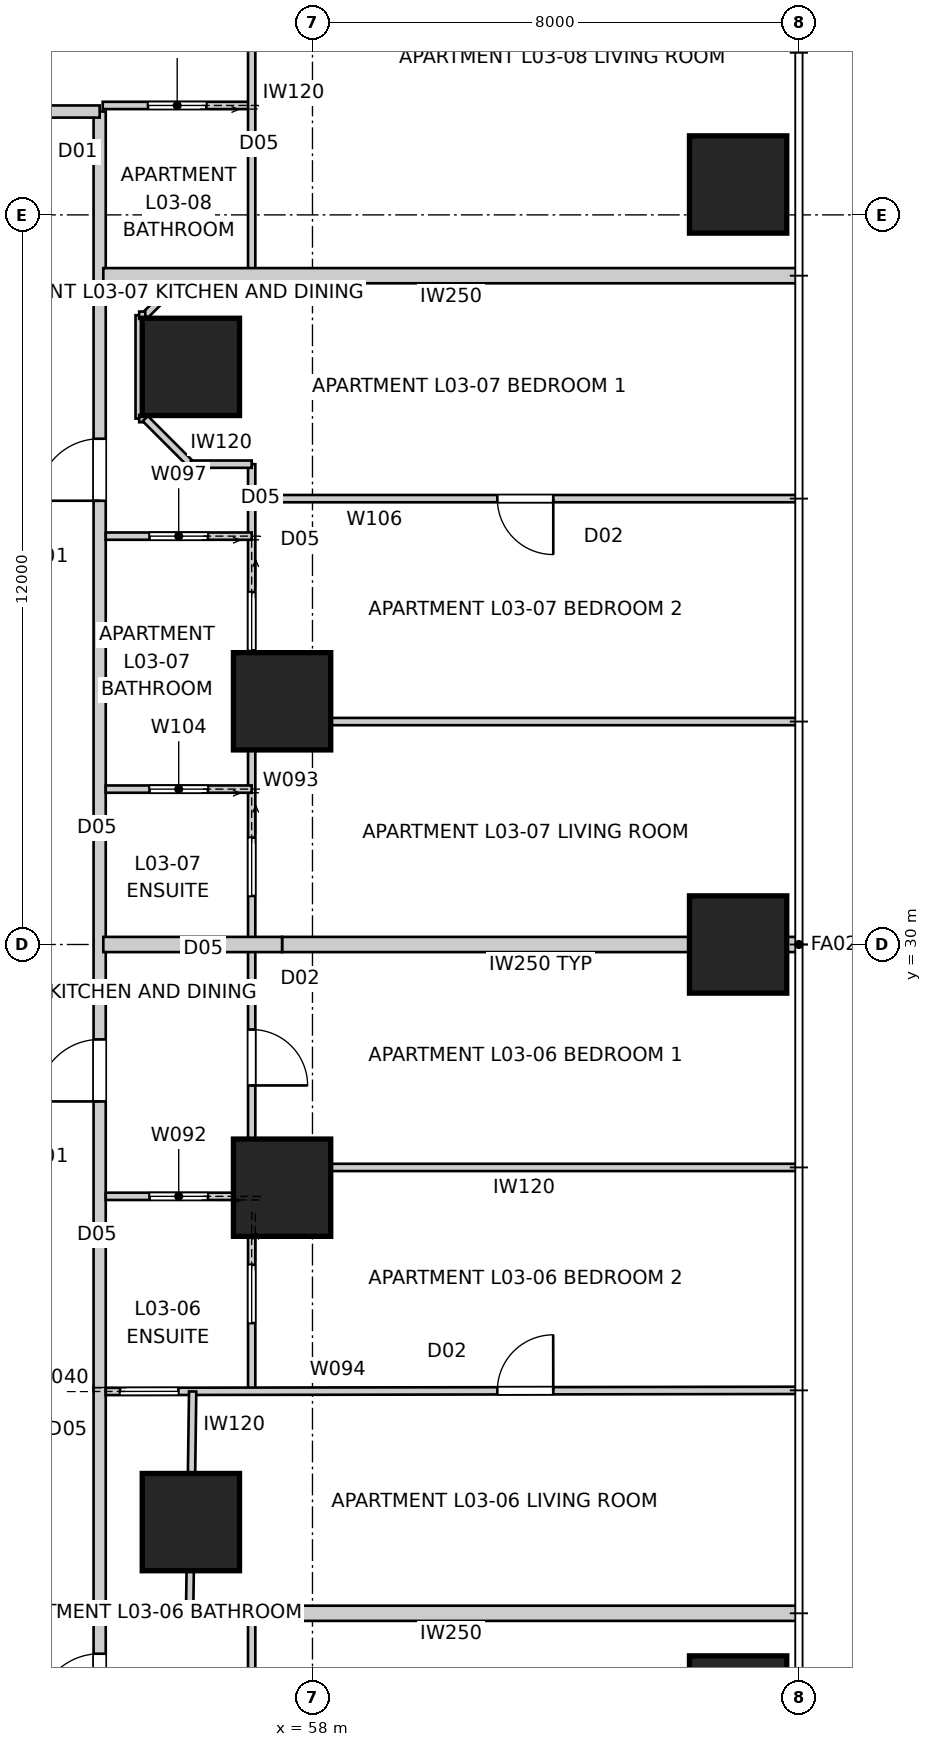
"""IFC4 building model, lengths in metres.
Left out: names, types, materials, properties, quantities, classifications, styles, units other than length and angle.
Written with IfcOpenShell. Run it as: python <this file> out.ifc"""

import sys

from ifc_helpers import new_model, si_unit, direction, frame, frame_2d, origin, origin_2d, place, context, subcontext, project, spatial, rectangle, extrude, element, fill, save


model = new_model("IFC4")
c1 = context("Model", 3, precision=1e-05, world=origin(), true_north=direction((0.0, 1.0)))
c2 = subcontext(c1, "Body", "Model", "MODEL_VIEW")
j1 = project(units=[si_unit("LENGTHUNIT", "METRE"), si_unit("PLANEANGLEUNIT", "RADIAN")], contexts=[c1])
p1 = place(None, origin())
s1 = spatial("IfcSite", under=j1, at=p1, CompositionType="ELEMENT")
p2 = place(p1, origin())
s2 = spatial("IfcBuilding", under=s1, at=p2, CompositionType="ELEMENT")
p3 = place(p2, frame((0.0, 0.0, 15.0)))
s3 = spatial("IfcBuildingStorey", under=s2, at=p3, CompositionType="ELEMENT", Elevation=15.0)
for number, where, z_axis, x_axis in (
    (1, (65.0, 17.5, 0.0), (0.0, 0.0, 1.0), (1.0, 0.0, 0.0)),
    (2, (65.0, 30.0, 0.0), (0.0, 0.0, 1.0), (1.0, 0.0, 0.0)),
    (3, (65.0, 42.5, 0.0), (0.0, 0.0, 1.0), (1.0, 0.0, 0.0)),
    (4, (57.5, 26.0, 0.0), (0.0, 0.0, 1.0), (1.0, 0.0, 0.0)),
    (5, (57.5, 34.0, 0.0), (0.0, 0.0, 1.0), (1.0, 0.0, 0.0)),
    (6, (56.0, 39.5, 0.0), (0.0, 0.0, 1.0), (1.0, 0.0, 0.0)),
    (7, (56.0, 20.5, 0.0), (0.0, 0.0, 1.0), (1.0, 0.0, 0.0)),
):
    element("IfcColumn", number, at=place(p3, frame(where, z_axis=z_axis, x_axis=x_axis)), inside=s3, PredefinedType="COLUMN", context=c2, shape_type="SweptSolid", body=[
        extrude(rectangle(XDim=1.6, YDim=1.6, at=origin_2d()), origin(), (0.0, 0.0, 1.0), 3.4),
    ])
p4 = place(p3, frame((54.5, 16.3, 0.0), z_axis=(0.0, 0.0, 1.0), x_axis=(0.0, 1.0, 0.0)))
e8 = element("IfcWall", 8, at=p4, inside=s3, PredefinedType="PARTITIONING", context=c2, shape_type="SweptSolid", body=[
    extrude(rectangle(XDim=27.4, YDim=0.2, at=frame_2d((13.7, 0.0))), origin(), (0.0, 0.0, 1.0), 3.25),
])
p5 = place(p4, frame((20.998, 0.0, 0.0)))
e9 = element("IfcOpeningElement", 9, at=p5, cuts=e8, PredefinedType="OPENING", context=c2, shape_type="SweptSolid", body=[
    extrude(rectangle(XDim=1.02, YDim=2.34, at=frame_2d((0.51, 1.17))), frame((0.0, 0.11, 0.0), z_axis=(0.0, -1.0, 0.0), x_axis=(1.0, 0.0, 0.0)), (0.0, 0.0, 1.0), 0.22),
])
p6 = place(p4, frame((11.119, 0.0, 0.0)))
e10 = element("IfcOpeningElement", 10, at=p6, cuts=e8, PredefinedType="OPENING", context=c2, shape_type="SweptSolid", body=[
    extrude(rectangle(XDim=1.02, YDim=2.34, at=frame_2d((0.51, 1.17))), frame((0.0, 0.11, 0.0), z_axis=(0.0, -1.0, 0.0), x_axis=(1.0, 0.0, 0.0)), (0.0, 0.0, 1.0), 0.22),
])
p7 = place(p4, frame((1.015, 0.0, 0.0)))
e11 = element("IfcOpeningElement", 11, at=p7, cuts=e8, PredefinedType="OPENING", context=c2, shape_type="SweptSolid", body=[
    extrude(rectangle(XDim=1.02, YDim=2.34, at=frame_2d((0.51, 1.17))), frame((0.0, 0.11, 0.0), z_axis=(0.0, -1.0, 0.0), x_axis=(1.0, 0.0, 0.0)), (0.0, 0.0, 1.0), 0.22),
])
p8 = place(p3, frame((54.5, 43.7, 0.0), z_axis=(0.0, 0.0, 1.0), x_axis=(-1.0, 0.0, 0.0)))
e12 = element("IfcWall", 12, at=p8, inside=s3, PredefinedType="PARTITIONING", context=c2, shape_type="SweptSolid", body=[
    extrude(rectangle(XDim=29.0, YDim=0.2, at=frame_2d((14.5, 0.0))), origin(), (0.0, 0.0, 1.0), 3.25),
])
p9 = place(p8, frame((22.253, 0.0, 0.0)))
e13 = element("IfcOpeningElement", 13, at=p9, cuts=e12, PredefinedType="OPENING", context=c2, shape_type="SweptSolid", body=[
    extrude(rectangle(XDim=1.02, YDim=2.34, at=frame_2d((0.51, 1.17))), frame((0.0, 0.11, 0.0), z_axis=(0.0, -1.0, 0.0), x_axis=(1.0, 0.0, 0.0)), (0.0, 0.0, 1.0), 0.22),
])
p10 = place(p8, frame((5.393, 0.0, 0.0)))
e14 = element("IfcOpeningElement", 14, at=p10, cuts=e12, PredefinedType="OPENING", context=c2, shape_type="SweptSolid", body=[
    extrude(rectangle(XDim=1.02, YDim=2.34, at=frame_2d((0.51, 1.17))), frame((0.0, 0.11, 0.0), z_axis=(0.0, -1.0, 0.0), x_axis=(1.0, 0.0, 0.0)), (0.0, 0.0, 1.0), 0.22),
])
p11 = place(p8, frame((1.281, 0.0, 0.0)))
e15 = element("IfcOpeningElement", 15, at=p11, cuts=e12, PredefinedType="OPENING", context=c2, shape_type="SweptSolid", body=[
    extrude(rectangle(XDim=1.02, YDim=2.34, at=frame_2d((0.51, 1.17))), frame((0.0, 0.11, 0.0), z_axis=(0.0, -1.0, 0.0), x_axis=(1.0, 0.0, 0.0)), (0.0, 0.0, 1.0), 0.22),
])
for number, where, z_axis, x_axis in (
    (16, (66.0, 19.0, 0.0), (0.0, 0.0, 1.0), (-1.0, 0.0, 0.0)),
    (17, (66.0, 41.0, 0.0), (0.0, 0.0, 1.0), (-1.0, 0.0, 0.0)),
):
    element("IfcWall", number, at=place(p3, frame(where, z_axis=z_axis, x_axis=x_axis)), inside=s3, PredefinedType="PARTITIONING", context=c2, shape_type="SweptSolid", body=[
        extrude(rectangle(XDim=11.44, YDim=0.25, at=frame_2d((5.72, 0.0))), origin(), (0.0, 0.0, 1.0), 3.25),
    ])
p12 = place(p3, frame((66.0, 30.0, 0.0), z_axis=(0.0, 0.0, 1.0), x_axis=(-1.0, 0.0, 0.0)))
e18 = element("IfcWall", 18, at=p12, inside=s3, PredefinedType="PARTITIONING", context=c2, shape_type="SweptSolid", body=[
    extrude(rectangle(XDim=8.5, YDim=0.25, at=frame_2d((4.25, 0.0))), origin(), (0.0, 0.0, 1.0), 3.25),
])
p13 = place(p3, frame((57.5, 30.0, 0.0), z_axis=(0.0, 0.0, 1.0), x_axis=(-1.0, 0.0, 0.0)))
e19 = element("IfcWall", 19, at=p13, inside=s3, PredefinedType="PARTITIONING", context=c2, shape_type="SweptSolid", body=[
    extrude(rectangle(XDim=2.94, YDim=0.25, at=frame_2d((1.47, 0.0))), origin(), (0.0, 0.0, 1.0), 2.796),
])
p14 = place(p3, frame((57.0, 19.0, 0.0), z_axis=(0.0, 0.0, 1.0), x_axis=(0.0, -1.0, 0.0)))
e20 = element("IfcWall", 20, at=p14, inside=s3, PredefinedType="PARTITIONING", context=c2, shape_type="SweptSolid", body=[
    extrude(rectangle(XDim=6.0, YDim=0.12, at=frame_2d((3.0, 0.0))), origin(), (0.0, 0.0, 1.0), 3.25),
])
p15 = place(p14, frame((2.54, 0.0, 0.0)))
e21 = element("IfcOpeningElement", 21, at=p15, cuts=e20, PredefinedType="OPENING", context=c2, shape_type="SweptSolid", body=[
    extrude(rectangle(XDim=0.92, YDim=2.34, at=frame_2d((0.46, 1.17))), frame((0.0, 0.07, 0.0), z_axis=(0.0, -1.0, 0.0), x_axis=(1.0, 0.0, 0.0)), (0.0, 0.0, 1.0), 0.14),
])
p16 = place(p3, frame((57.0, 25.858, 0.0), z_axis=(0.0, 0.0, 1.0), x_axis=(-1.0, 0.0, 0.0)))
e22 = element("IfcWall", 22, at=p16, inside=s3, PredefinedType="PARTITIONING", context=c2, shape_type="SweptSolid", body=[
    extrude(rectangle(XDim=2.4, YDim=0.12, at=frame_2d((1.2, 0.0))), origin(), (0.0, 0.0, 1.0), 3.25),
])
p17 = place(p16, frame((0.72, 0.0, 0.0)))
e23 = element("IfcOpeningElement", 23, at=p17, cuts=e22, PredefinedType="OPENING", context=c2, shape_type="SweptSolid", body=[
    extrude(rectangle(XDim=0.96, YDim=2.1, at=frame_2d((0.48, 1.05))), frame((0.0, 0.07, 0.0), z_axis=(0.0, -1.0, 0.0), x_axis=(1.0, 0.0, 0.0)), (0.0, 0.0, 1.0), 0.14),
])
p18 = place(p3, frame((57.0, 37.9, 0.0), z_axis=(0.0, 0.0, 1.0), x_axis=(0.0, -1.0, 0.0)))
e24 = element("IfcWall", 24, at=p18, inside=s3, PredefinedType="PARTITIONING", context=c2, shape_type="SweptSolid", body=[
    extrude(rectangle(XDim=15.251, YDim=0.12, at=frame_2d((7.625, 0.0))), origin(), (0.0, 0.0, 1.0), 2.549),
])
p19 = place(p18, frame((9.298, 0.0, 0.0)))
e25 = element("IfcOpeningElement", 25, at=p19, cuts=e24, PredefinedType="OPENING", context=c2, shape_type="SweptSolid", body=[
    extrude(rectangle(XDim=0.92, YDim=2.34, at=frame_2d((0.46, 1.17))), frame((0.0, 0.07, 0.0), z_axis=(0.0, -1.0, 0.0), x_axis=(1.0, 0.0, 0.0)), (0.0, 0.0, 1.0), 0.14),
])
p20 = place(p18, frame((2.104, 0.0, 0.0)))
e26 = element("IfcOpeningElement", 26, at=p20, cuts=e24, PredefinedType="OPENING", context=c2, shape_type="SweptSolid", body=[
    extrude(rectangle(XDim=0.96, YDim=2.1, at=frame_2d((0.48, 1.05))), frame((0.0, 0.07, 0.0), z_axis=(0.0, -1.0, 0.0), x_axis=(1.0, 0.0, 0.0)), (0.0, 0.0, 1.0), 0.14),
])
p21 = place(p18, frame((13.167, 0.0, 0.0)))
e27 = element("IfcOpeningElement", 27, at=p21, cuts=e24, PredefinedType="OPENING", context=c2, shape_type="SweptSolid", body=[
    extrude(rectangle(XDim=0.96, YDim=2.1, at=frame_2d((0.48, 1.05))), frame((0.0, 0.07, 0.0), z_axis=(0.0, -1.0, 0.0), x_axis=(1.0, 0.0, 0.0)), (0.0, 0.0, 1.0), 0.14),
])
p22 = place(p18, frame((6.142, 0.0, 0.0)))
e28 = element("IfcOpeningElement", 28, at=p22, cuts=e24, PredefinedType="OPENING", context=c2, shape_type="SweptSolid", body=[
    extrude(rectangle(XDim=0.96, YDim=2.1, at=frame_2d((0.48, 1.05))), frame((0.0, 0.07, 0.0), z_axis=(0.0, -1.0, 0.0), x_axis=(1.0, 0.0, 0.0)), (0.0, 0.0, 1.0), 0.14),
])
p23 = place(p3, frame((54.6, 22.649, 0.0), z_axis=(0.0, 0.0, 1.0), x_axis=(0.999998735361, 0.001590369792, 0.0)))
e29 = element("IfcWall", 29, at=p23, inside=s3, PredefinedType="PARTITIONING", context=c2, shape_type="SweptSolid", body=[
    extrude(rectangle(XDim=11.36, YDim=0.12, at=frame_2d((5.68, 0.0))), origin(), (0.0, 0.0, 1.0), 3.25),
])
p24 = place(p23, frame((0.235, 0.0, 0.0)))
e30 = element("IfcOpeningElement", 30, at=p24, cuts=e29, PredefinedType="OPENING", context=c2, shape_type="SweptSolid", body=[
    extrude(rectangle(XDim=0.96, YDim=2.1, at=frame_2d((0.48, 1.05))), frame((0.0, 0.07, 0.0), z_axis=(0.0, -1.0, 0.0), x_axis=(1.0, 0.0, 0.0)), (0.0, 0.0, 1.0), 0.14),
])
p25 = place(p23, frame((6.44, 0.0, 0.0)))
e31 = element("IfcOpeningElement", 31, at=p25, cuts=e29, PredefinedType="OPENING", context=c2, shape_type="SweptSolid", body=[
    extrude(rectangle(XDim=0.92, YDim=2.34, at=frame_2d((0.46, 1.17))), frame((0.0, 0.07, 0.0), z_axis=(0.0, -1.0, 0.0), x_axis=(1.0, 0.0, 0.0)), (0.0, 0.0, 1.0), 0.14),
])
p26 = place(p3, frame((56.029, 22.649, 0.0), z_axis=(0.0, 0.0, 1.0), x_axis=(-0.013648778697, -0.999906851082, 0.0)))
e32 = element("IfcWall", 32, at=p26, inside=s3, PredefinedType="PARTITIONING", context=c2, shape_type="SweptSolid", body=[
    extrude(rectangle(XDim=3.649, YDim=0.12, at=frame_2d((1.824, 0.0))), origin(), (0.0, 0.0, 1.0), 2.549),
])
p27 = place(p3, frame((65.96, 26.333, 0.0), z_axis=(0.0, 0.0, 1.0), x_axis=(-1.0, 0.0, 0.0)))
e33 = element("IfcWall", 33, at=p27, inside=s3, PredefinedType="PARTITIONING", context=c2, shape_type="SweptSolid", body=[
    extrude(rectangle(XDim=8.96, YDim=0.12, at=frame_2d((4.48, 0.0))), origin(), (0.0, 0.0, 1.0), 3.25),
])
p28 = place(p3, frame((57.0, 36.716, 0.0), z_axis=(0.0, 0.0, 1.0), x_axis=(-1.0, 0.0, 0.0)))
e34 = element("IfcWall", 34, at=p28, inside=s3, PredefinedType="PARTITIONING", context=c2, shape_type="SweptSolid", body=[
    extrude(rectangle(XDim=2.4, YDim=0.12, at=frame_2d((1.2, 0.0))), origin(), (0.0, 0.0, 1.0), 3.25),
])
p29 = place(p28, frame((0.72, 0.0, 0.0)))
e35 = element("IfcOpeningElement", 35, at=p29, cuts=e34, PredefinedType="OPENING", context=c2, shape_type="SweptSolid", body=[
    extrude(rectangle(XDim=0.96, YDim=2.1, at=frame_2d((0.48, 1.05))), frame((0.0, 0.07, 0.0), z_axis=(0.0, -1.0, 0.0), x_axis=(1.0, 0.0, 0.0)), (0.0, 0.0, 1.0), 0.14),
])
p30 = place(p3, frame((55.9, 41.0, 0.0), z_axis=(0.0, 0.0, 1.0), x_axis=(-0.707106781187, -0.707106781187, 0.0)))
e36 = element("IfcWall", 36, at=p30, inside=s3, PredefinedType="PARTITIONING", context=c2, shape_type="SweptSolid", body=[
    extrude(rectangle(XDim=0.919, YDim=0.12, at=frame_2d((0.459, 0.0))), origin(), (0.0, 0.0, 1.0), 3.25),
])
p31 = place(p3, frame((55.15, 40.35, 0.0), z_axis=(0.0, 0.0, 1.0), x_axis=(0.0, -1.0, 0.0)))
e37 = element("IfcWall", 37, at=p31, inside=s3, PredefinedType="PARTITIONING", context=c2, shape_type="SweptSolid", body=[
    extrude(rectangle(XDim=1.7, YDim=0.12, at=frame_2d((0.85, 0.0))), origin(), (0.0, 0.0, 1.0), 3.25),
])
p32 = place(p3, frame((55.25, 38.65, 0.0), z_axis=(0.0, 0.0, 1.0), x_axis=(0.707106781187, -0.707106781187, 0.0)))
e38 = element("IfcWall", 38, at=p32, inside=s3, PredefinedType="PARTITIONING", context=c2, shape_type="SweptSolid", body=[
    extrude(rectangle(XDim=1.061, YDim=0.12, at=frame_2d((0.53, 0.0))), origin(), (0.0, 0.0, 1.0), 3.25),
])
p33 = place(p3, frame((56.0, 37.9, 0.0), z_axis=(0.0, 0.0, 1.0), x_axis=(1.0, 0.0, 0.0)))
e39 = element("IfcWall", 39, at=p33, inside=s3, PredefinedType="PARTITIONING", context=c2, shape_type="SweptSolid", body=[
    extrude(rectangle(XDim=1.0, YDim=0.12, at=frame_2d((0.5, 0.0))), origin(), (0.0, 0.0, 1.0), 3.25),
])
p34 = place(p3, frame((57.0, 32.555, 0.0), z_axis=(0.0, 0.0, 1.0), x_axis=(-1.0, 0.0, 0.0)))
e40 = element("IfcWall", 40, at=p34, inside=s3, PredefinedType="PARTITIONING", context=c2, shape_type="SweptSolid", body=[
    extrude(rectangle(XDim=2.4, YDim=0.12, at=frame_2d((1.2, 0.0))), origin(), (0.0, 0.0, 1.0), 3.25),
])
p35 = place(p34, frame((0.72, 0.0, 0.0)))
e41 = element("IfcOpeningElement", 41, at=p35, cuts=e40, PredefinedType="OPENING", context=c2, shape_type="SweptSolid", body=[
    extrude(rectangle(XDim=0.96, YDim=2.1, at=frame_2d((0.48, 1.05))), frame((0.0, 0.07, 0.0), z_axis=(0.0, -1.0, 0.0), x_axis=(1.0, 0.0, 0.0)), (0.0, 0.0, 1.0), 0.14),
])
p36 = place(p3, frame((57.0, 33.667, 0.0), z_axis=(0.0, 0.0, 1.0), x_axis=(1.0, 0.0, 0.0)))
e42 = element("IfcWall", 42, at=p36, inside=s3, PredefinedType="PARTITIONING", context=c2, shape_type="SweptSolid", body=[
    extrude(rectangle(XDim=8.96, YDim=0.12, at=frame_2d((4.48, 0.0))), origin(), (0.0, 0.0, 1.0), 3.25),
])
p37 = place(p3, frame((65.96, 37.333, 0.0), z_axis=(0.0, 0.0, 1.0), x_axis=(-1.0, 0.0, 0.0)))
e43 = element("IfcWall", 43, at=p37, inside=s3, PredefinedType="PARTITIONING", context=c2, shape_type="SweptSolid", body=[
    extrude(rectangle(XDim=8.96, YDim=0.12, at=frame_2d((4.48, 0.0))), origin(), (0.0, 0.0, 1.0), 3.25),
])
p38 = place(p37, frame((4.0, 0.0, 0.0)))
e44 = element("IfcOpeningElement", 44, at=p38, cuts=e43, PredefinedType="OPENING", context=c2, shape_type="SweptSolid", body=[
    extrude(rectangle(XDim=0.92, YDim=2.34, at=frame_2d((0.46, 1.17))), frame((0.0, 0.07, 0.0), z_axis=(0.0, -1.0, 0.0), x_axis=(1.0, 0.0, 0.0)), (0.0, 0.0, 1.0), 0.14),
])
p39 = place(p3, frame((57.0, 43.8, 0.0), z_axis=(0.0, 0.0, 1.0), x_axis=(-1.0, 0.0, 0.0)))
e45 = element("IfcWall", 45, at=p39, inside=s3, PredefinedType="PARTITIONING", context=c2, shape_type="SweptSolid", body=[
    extrude(rectangle(XDim=2.45, YDim=0.12, at=frame_2d((1.225, 0.0))), origin(), (0.0, 0.0, 1.0), 3.25),
])
p40 = place(p39, frame((0.745, 0.0, 0.0)))
e46 = element("IfcOpeningElement", 46, at=p40, cuts=e45, PredefinedType="OPENING", context=c2, shape_type="SweptSolid", body=[
    extrude(rectangle(XDim=0.96, YDim=2.1, at=frame_2d((0.48, 1.05))), frame((0.0, 0.07, 0.0), z_axis=(0.0, -1.0, 0.0), x_axis=(1.0, 0.0, 0.0)), (0.0, 0.0, 1.0), 0.14),
])
p41 = place(p3, frame((57.0, 47.0, 0.0), z_axis=(0.0, 0.0, 1.0), x_axis=(0.0, -1.0, 0.0)))
e47 = element("IfcWall", 47, at=p41, inside=s3, PredefinedType="PARTITIONING", context=c2, shape_type="SweptSolid", body=[
    extrude(rectangle(XDim=6.0, YDim=0.12, at=frame_2d((3.0, 0.0))), origin(), (0.0, 0.0, 1.0), 3.25),
])
for number, where, z_axis, x_axis in (
    (48, (55.15, 40.35, 0.0), (0.0, 0.0, 1.0), (1.0, 0.0, 0.0)),
    (49, (55.15, 38.65, 0.0), (0.0, 0.0, 1.0), (1.0, 0.0, 0.0)),
):
    element("IfcWall", number, at=place(p3, frame(where, z_axis=z_axis, x_axis=x_axis)), inside=s3, PredefinedType="PARTITIONING", context=c2, shape_type="SweptSolid", body=[
        extrude(rectangle(XDim=0.1, YDim=0.12, at=frame_2d((0.05, 0.0))), origin(), (0.0, 0.0, 1.0), 3.25),
    ])
p42 = place(p5, origin())
e50 = element("IfcDoor", 50, at=p42, inside=s3, OperationType="SINGLE_SWING_LEFT", PredefinedType="DOOR", context=c2, shape_type="SweptSolid", body=[
    extrude(rectangle(XDim=1.02, YDim=2.34, at=frame_2d((0.51, 1.17))), frame((0.0, 0.025, 0.0), z_axis=(0.0, -1.0, 0.0), x_axis=(1.0, 0.0, 0.0)), (0.0, 0.0, 1.0), 0.05),
])
fill(e9, e50)
p43 = place(p6, origin())
e51 = element("IfcDoor", 51, at=p43, inside=s3, OperationType="SINGLE_SWING_LEFT", PredefinedType="DOOR", context=c2, shape_type="SweptSolid", body=[
    extrude(rectangle(XDim=1.02, YDim=2.34, at=frame_2d((0.51, 1.17))), frame((0.0, 0.025, 0.0), z_axis=(0.0, -1.0, 0.0), x_axis=(1.0, 0.0, 0.0)), (0.0, 0.0, 1.0), 0.05),
])
fill(e10, e51)
p44 = place(p7, origin())
e52 = element("IfcDoor", 52, at=p44, inside=s3, OperationType="SINGLE_SWING_LEFT", PredefinedType="DOOR", context=c2, shape_type="SweptSolid", body=[
    extrude(rectangle(XDim=1.02, YDim=2.34, at=frame_2d((0.51, 1.17))), frame((0.0, 0.025, 0.0), z_axis=(0.0, -1.0, 0.0), x_axis=(1.0, 0.0, 0.0)), (0.0, 0.0, 1.0), 0.05),
])
fill(e11, e52)
p45 = place(p29, origin())
e53 = element("IfcDoor", 53, at=p45, inside=s3, OperationType="SLIDING_TO_LEFT", PredefinedType="DOOR", context=c2, shape_type="SweptSolid", body=[
    extrude(rectangle(XDim=0.96, YDim=2.1, at=frame_2d((0.48, 1.05))), frame((0.0, 0.025, 0.0), z_axis=(0.0, -1.0, 0.0), x_axis=(1.0, 0.0, 0.0)), (0.0, 0.0, 1.0), 0.05),
])
fill(e35, e53)
p46 = place(p19, origin())
e54 = element("IfcDoor", 54, at=p46, inside=s3, OperationType="SINGLE_SWING_RIGHT", PredefinedType="DOOR", context=c2, shape_type="SweptSolid", body=[
    extrude(rectangle(XDim=0.92, YDim=2.34, at=frame_2d((0.46, 1.17))), frame((0.0, 0.025, 0.0), z_axis=(0.0, -1.0, 0.0), x_axis=(1.0, 0.0, 0.0)), (0.0, 0.0, 1.0), 0.05),
])
fill(e25, e54)
p47 = place(p17, origin())
e55 = element("IfcDoor", 55, at=p47, inside=s3, OperationType="SLIDING_TO_LEFT", PredefinedType="DOOR", context=c2, shape_type="SweptSolid", body=[
    extrude(rectangle(XDim=0.96, YDim=2.1, at=frame_2d((0.48, 1.05))), frame((0.0, 0.025, 0.0), z_axis=(0.0, -1.0, 0.0), x_axis=(1.0, 0.0, 0.0)), (0.0, 0.0, 1.0), 0.05),
])
fill(e23, e55)
p48 = place(p40, origin())
e56 = element("IfcDoor", 56, at=p48, inside=s3, OperationType="SLIDING_TO_LEFT", PredefinedType="DOOR", context=c2, shape_type="SweptSolid", body=[
    extrude(rectangle(XDim=0.96, YDim=2.1, at=frame_2d((0.48, 1.05))), frame((0.0, 0.025, 0.0), z_axis=(0.0, -1.0, 0.0), x_axis=(1.0, 0.0, 0.0)), (0.0, 0.0, 1.0), 0.05),
])
fill(e46, e56)
p49 = place(p20, origin())
e57 = element("IfcDoor", 57, at=p49, inside=s3, OperationType="SLIDING_TO_LEFT", PredefinedType="DOOR", context=c2, shape_type="SweptSolid", body=[
    extrude(rectangle(XDim=0.96, YDim=2.1, at=frame_2d((0.48, 1.05))), frame((0.0, 0.025, 0.0), z_axis=(0.0, -1.0, 0.0), x_axis=(1.0, 0.0, 0.0)), (0.0, 0.0, 1.0), 0.05),
])
fill(e26, e57)
p50 = place(p35, origin())
e58 = element("IfcDoor", 58, at=p50, inside=s3, OperationType="SLIDING_TO_LEFT", PredefinedType="DOOR", context=c2, shape_type="SweptSolid", body=[
    extrude(rectangle(XDim=0.96, YDim=2.1, at=frame_2d((0.48, 1.05))), frame((0.0, 0.025, 0.0), z_axis=(0.0, -1.0, 0.0), x_axis=(1.0, 0.0, 0.0)), (0.0, 0.0, 1.0), 0.05),
])
fill(e41, e58)
p51 = place(p21, origin())
e59 = element("IfcDoor", 59, at=p51, inside=s3, OperationType="SLIDING_TO_LEFT", PredefinedType="DOOR", context=c2, shape_type="SweptSolid", body=[
    extrude(rectangle(XDim=0.96, YDim=2.1, at=frame_2d((0.48, 1.05))), frame((0.0, 0.025, 0.0), z_axis=(0.0, -1.0, 0.0), x_axis=(1.0, 0.0, 0.0)), (0.0, 0.0, 1.0), 0.05),
])
fill(e27, e59)
p52 = place(p24, origin())
e60 = element("IfcDoor", 60, at=p52, inside=s3, OperationType="SLIDING_TO_LEFT", PredefinedType="DOOR", context=c2, shape_type="SweptSolid", body=[
    extrude(rectangle(XDim=0.96, YDim=2.1, at=frame_2d((0.48, 1.05))), frame((0.0, 0.025, 0.0), z_axis=(0.0, -1.0, 0.0), x_axis=(1.0, 0.0, 0.0)), (0.0, 0.0, 1.0), 0.05),
])
fill(e30, e60)
p53 = place(p22, origin())
e61 = element("IfcDoor", 61, at=p53, inside=s3, OperationType="SLIDING_TO_LEFT", PredefinedType="DOOR", context=c2, shape_type="SweptSolid", body=[
    extrude(rectangle(XDim=0.96, YDim=2.1, at=frame_2d((0.48, 1.05))), frame((0.0, 0.025, 0.0), z_axis=(0.0, -1.0, 0.0), x_axis=(1.0, 0.0, 0.0)), (0.0, 0.0, 1.0), 0.05),
])
fill(e28, e61)
p54 = place(p38, origin())
e62 = element("IfcDoor", 62, at=p54, inside=s3, OperationType="SINGLE_SWING_LEFT", PredefinedType="DOOR", context=c2, shape_type="SweptSolid", body=[
    extrude(rectangle(XDim=0.92, YDim=2.34, at=frame_2d((0.46, 1.17))), frame((0.0, 0.025, 0.0), z_axis=(0.0, -1.0, 0.0), x_axis=(1.0, 0.0, 0.0)), (0.0, 0.0, 1.0), 0.05),
])
fill(e44, e62)
p55 = place(p25, origin())
e63 = element("IfcDoor", 63, at=p55, inside=s3, OperationType="SINGLE_SWING_RIGHT", PredefinedType="DOOR", context=c2, shape_type="SweptSolid", body=[
    extrude(rectangle(XDim=0.92, YDim=2.34, at=frame_2d((0.46, 1.17))), frame((0.0, 0.025, 0.0), z_axis=(0.0, -1.0, 0.0), x_axis=(1.0, 0.0, 0.0)), (0.0, 0.0, 1.0), 0.05),
])
fill(e31, e63)
save(model, sys.argv[1])
